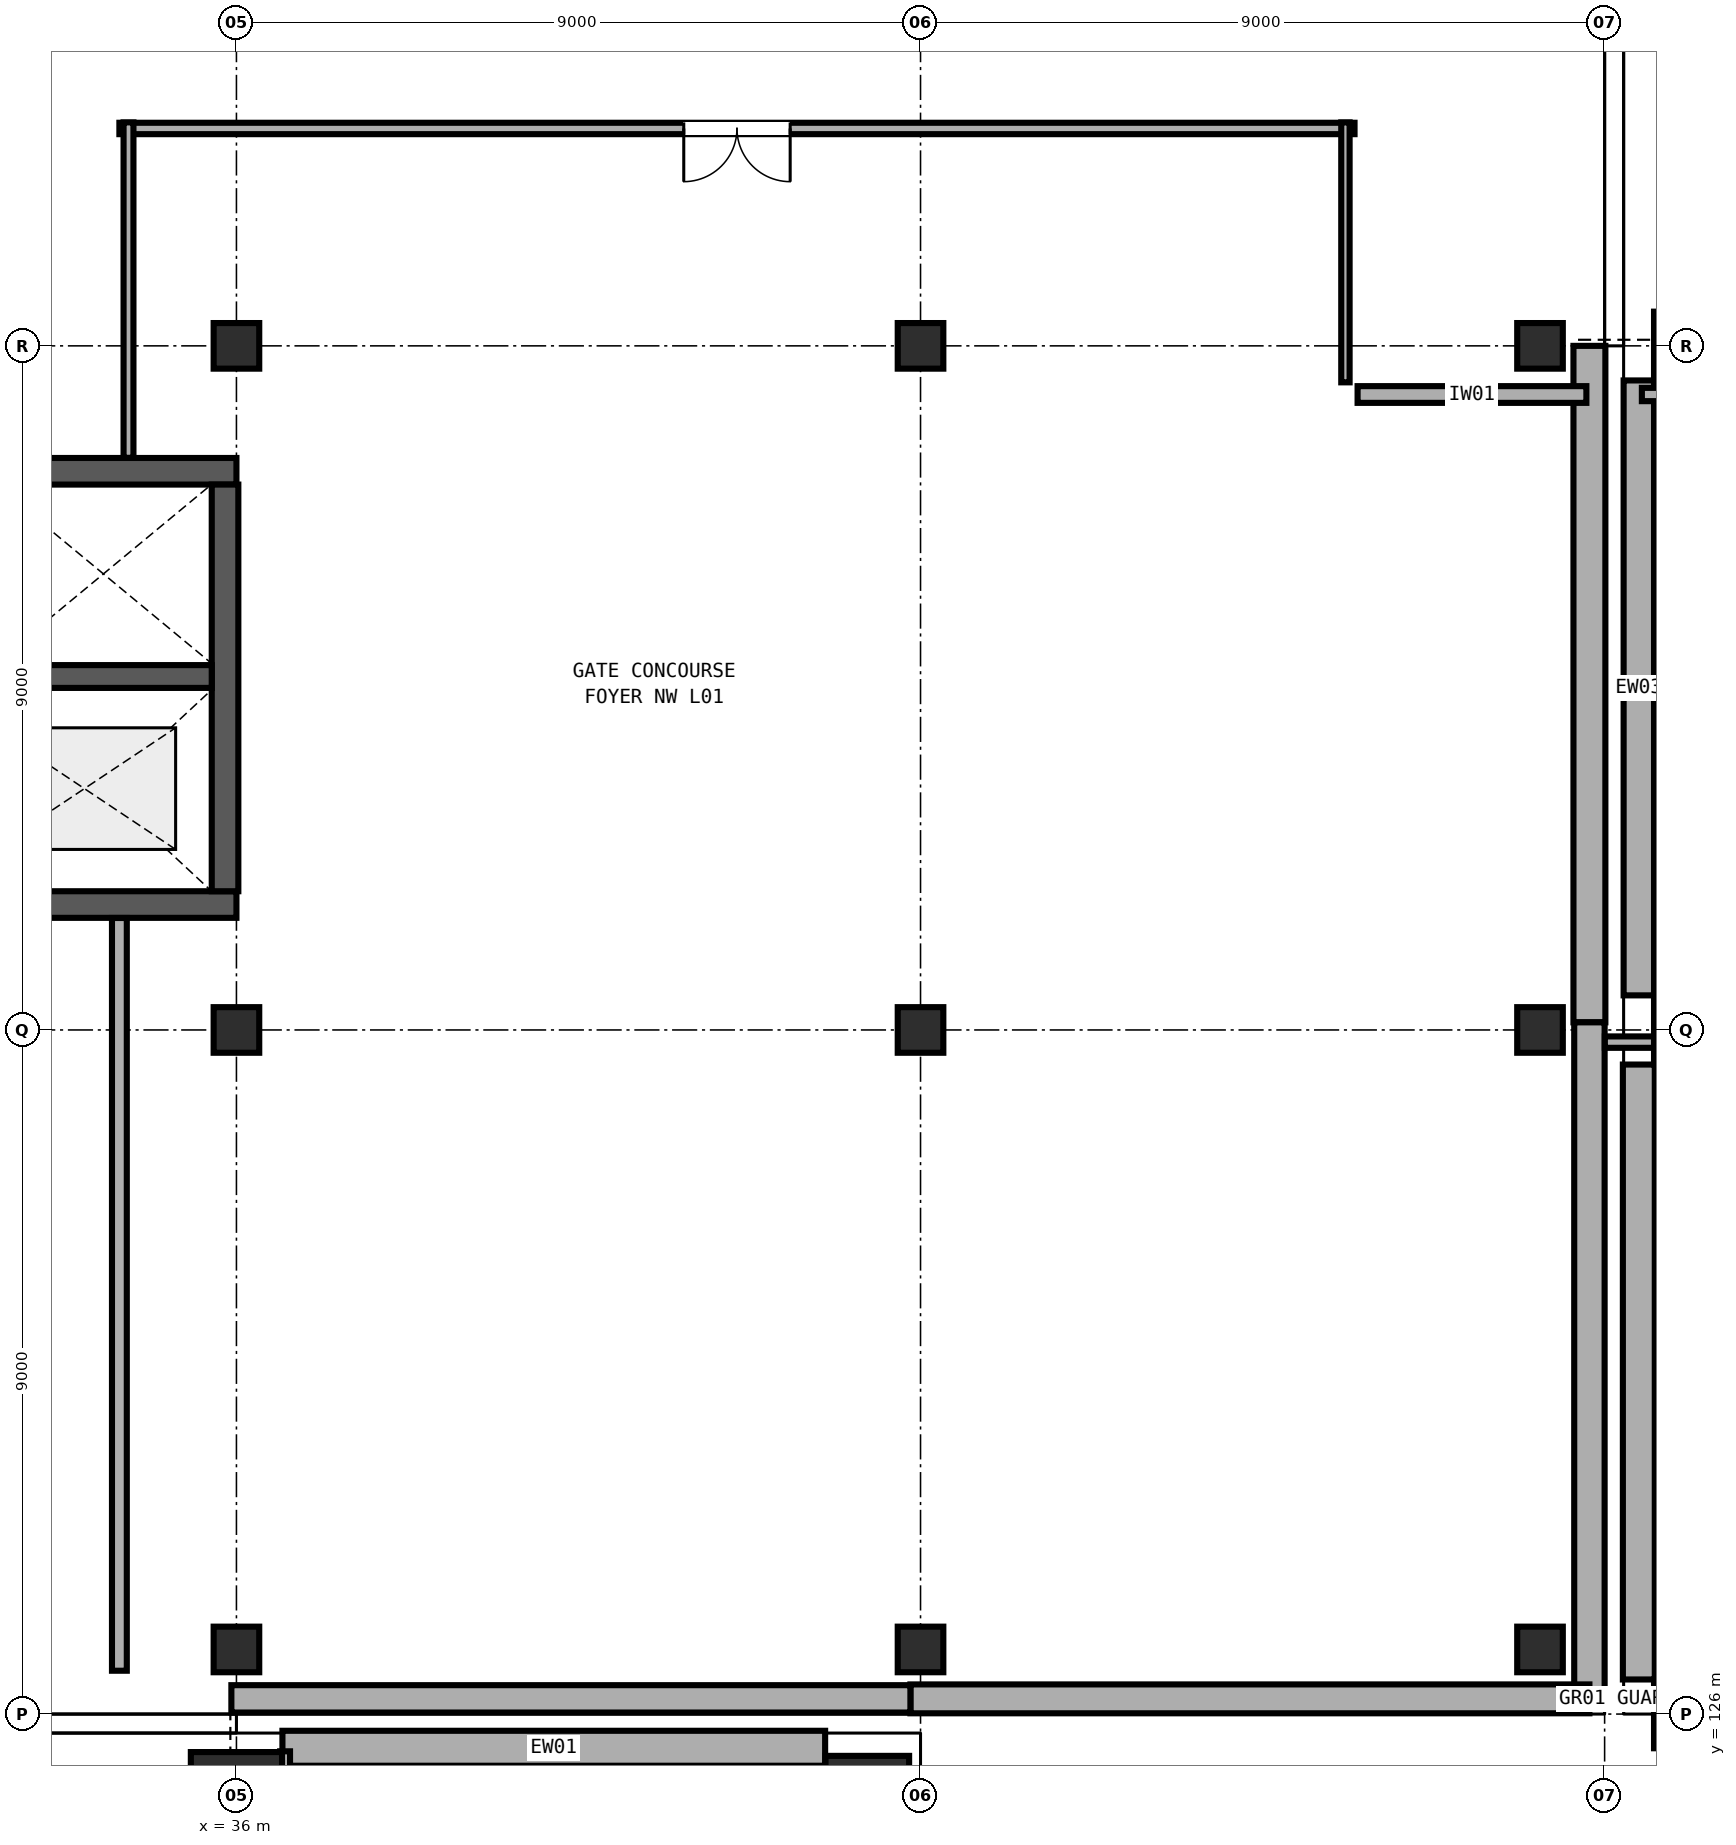
"""IFC4 building model, lengths in metres.
Left out: names, types, materials, properties, quantities, classifications, styles, units other than length and angle.
Written with IfcOpenShell. Run it as: python <this file> out.ifc"""

import sys

from ifc_helpers import new_model, si_unit, direction, frame, frame_2d, origin, origin_2d, place, context, subcontext, project, spatial, rectangle, extrude, element, fill, save


model = new_model("IFC4")
c1 = context("Model", 3, precision=1e-05, world=origin(), true_north=direction((0.0, 1.0)))
c2 = subcontext(c1, "Body", "Model", "MODEL_VIEW")
j1 = project(units=[si_unit("LENGTHUNIT", "METRE"), si_unit("PLANEANGLEUNIT", "RADIAN")], contexts=[c1])
p1 = place(None, origin())
s1 = spatial("IfcSite", under=j1, at=p1, CompositionType="ELEMENT")
p2 = place(p1, origin())
s2 = spatial("IfcBuilding", under=s1, at=p2, CompositionType="ELEMENT")
p3 = place(p2, frame((0.0, 0.0, 4.8)))
s3 = spatial("IfcBuildingStorey", under=s2, at=p3, CompositionType="ELEMENT", Elevation=4.8)
p4 = place(p3, frame((36.0, 124.9, 0.0), z_axis=(0.0, 0.0, 1.0), x_axis=(1.0, 0.0, 0.0)))
e1 = element("IfcColumn", 1, at=p4, inside=s3, PredefinedType="COLUMN", context=c2, shape_type="SweptSolid", body=[
    extrude(rectangle(XDim=1.2, YDim=1.2, at=origin_2d()), origin(), (0.0, 0.0, 1.0), 4.8),
])
p5 = place(p3, frame((44.3, 124.9, 0.0), z_axis=(0.0, 0.0, 1.0), x_axis=(1.0, 0.0, 0.0)))
e2 = element("IfcColumn", 2, at=p5, inside=s3, PredefinedType="COLUMN", context=c2, shape_type="SweptSolid", body=[
    extrude(rectangle(XDim=1.1, YDim=1.1, at=origin_2d()), origin(), (0.0, 0.0, 1.0), 4.8),
])
for number, where, z_axis, x_axis in (
    (3, (55.1, 126.0, 0.0), (0.0, 0.0, 1.0), (1.0, 0.0, 0.0)),
    (4, (55.1, 135.0, 0.0), (0.0, 0.0, 1.0), (1.0, 0.0, 0.0)),
    (5, (55.1, 144.0, 0.0), (0.0, 0.0, 1.0), (1.0, 0.0, 0.0)),
):
    element("IfcColumn", number, at=place(p3, frame(where, z_axis=z_axis, x_axis=x_axis)), inside=s3, PredefinedType="COLUMN", context=c2, shape_type="SweptSolid", body=[
        extrude(rectangle(XDim=0.9, YDim=0.9, at=origin_2d()), origin(), (0.0, 0.0, 1.0), 4.8),
    ])
for number, where, z_axis, x_axis in (
    (6, (36.0, 126.85, 0.0), (0.0, 0.0, 1.0), (1.0, 0.0, 0.0)),
    (7, (36.0, 135.0, 0.0), (0.0, 0.0, 1.0), (1.0, 0.0, 0.0)),
    (8, (36.0, 144.0, 0.0), (0.0, 0.0, 1.0), (1.0, 0.0, 0.0)),
    (9, (45.0, 126.85, 0.0), (0.0, 0.0, 1.0), (1.0, 0.0, 0.0)),
    (10, (45.0, 135.0, 0.0), (0.0, 0.0, 1.0), (1.0, 0.0, 0.0)),
    (11, (45.0, 144.0, 0.0), (0.0, 0.0, 1.0), (1.0, 0.0, 0.0)),
    (12, (53.15, 126.85, 0.0), (0.0, 0.0, 1.0), (1.0, 0.0, 0.0)),
    (13, (53.15, 135.0, 0.0), (0.0, 0.0, 1.0), (1.0, 0.0, 0.0)),
    (14, (53.15, 144.0, 0.0), (0.0, 0.0, 1.0), (1.0, 0.0, 0.0)),
):
    element("IfcColumn", number, at=place(p3, frame(where, z_axis=z_axis, x_axis=x_axis)), inside=s3, PredefinedType="COLUMN", context=c2, shape_type="SweptSolid", body=[
        extrude(rectangle(XDim=0.6, YDim=0.6, at=origin_2d()), origin(), (0.0, 0.0, 1.0), 4.8),
    ])
p6 = place(p3, frame((18.0, 136.65, 0.0), z_axis=(0.0, 0.0, 1.0), x_axis=(1.0, 0.0, 0.0)))
e15 = element("IfcWall", 15, at=p6, inside=s3, PredefinedType="SHEAR", context=c2, shape_type="SweptSolid", body=[
    extrude(rectangle(XDim=18.0, YDim=0.35, at=frame_2d((9.0, 0.0))), origin(), (0.0, 0.0, 1.0), 4.565),
])
p7 = place(p3, frame((36.0, 142.35, 0.0), z_axis=(0.0, 0.0, 1.0), x_axis=(-1.0, 0.0, 0.0)))
e16 = element("IfcWall", 16, at=p7, inside=s3, PredefinedType="SHEAR", context=c2, shape_type="SweptSolid", body=[
    extrude(rectangle(XDim=18.0, YDim=0.35, at=frame_2d((9.0, 0.0))), origin(), (0.0, 0.0, 1.0), 4.565),
])
p8 = place(p7, frame((4.7, 0.0, 0.0)))
e17 = element("IfcOpeningElement", 17, at=p8, cuts=e16, PredefinedType="OPENING", context=c2, shape_type="SweptSolid", body=[
    extrude(rectangle(XDim=1.9, YDim=2.25, at=frame_2d((0.95, 1.125))), frame((0.0, 0.185, 0.0), z_axis=(0.0, -1.0, 0.0), x_axis=(1.0, 0.0, 0.0)), (0.0, 0.0, 1.0), 0.37),
])
p9 = place(p3, frame((35.85, 136.825, 0.0), z_axis=(0.0, 0.0, 1.0), x_axis=(0.0, 1.0, 0.0)))
e18 = element("IfcWall", 18, at=p9, inside=s3, PredefinedType="SHEAR", context=c2, shape_type="SweptSolid", body=[
    extrude(rectangle(XDim=5.35, YDim=0.35, at=frame_2d((2.675, 0.0))), origin(), (0.0, 0.0, 1.0), 4.565),
])
p10 = place(p3, frame((32.8, 139.65, 0.0), z_axis=(0.0, 0.0, 1.0), x_axis=(1.0, 0.0, 0.0)))
e19 = element("IfcWall", 19, at=p10, inside=s3, PredefinedType="SHEAR", context=c2, shape_type="SweptSolid", body=[
    extrude(rectangle(XDim=2.875, YDim=0.3, at=frame_2d((1.438, 0.0))), origin(), (0.0, 0.0, 1.0), 4.565),
])
p11 = place(p3, frame((36.605, 125.55, 0.0), z_axis=(0.0, 0.0, 1.0), x_axis=(1.0, 0.0, 0.0)))
e20 = element("IfcWall", 20, at=p11, inside=s3, PredefinedType="SOLIDWALL", context=c2, shape_type="SweptSolid", body=[
    extrude(rectangle(XDim=7.14, YDim=0.46, at=frame_2d((3.57, 0.0))), origin(), (0.0, 0.0, 1.0), 3.28),
])
p12 = place(p3, frame((54.45, 126.455, 0.0), z_axis=(0.0, 0.0, 1.0), x_axis=(0.0, 1.0, 0.0)))
e21 = element("IfcWall", 21, at=p12, inside=s3, PredefinedType="SOLIDWALL", context=c2, shape_type="SweptSolid", body=[
    extrude(rectangle(XDim=8.09, YDim=0.42, at=frame_2d((4.045, 0.0))), origin(), (0.0, 0.0, 1.0), 3.28),
])
p13 = place(p3, frame((54.45, 135.455, 0.0), z_axis=(0.0, 0.0, 1.0), x_axis=(0.0, 1.0, 0.0)))
e22 = element("IfcWall", 22, at=p13, inside=s3, PredefinedType="SOLIDWALL", context=c2, shape_type="SweptSolid", body=[
    extrude(rectangle(XDim=8.09, YDim=0.4, at=frame_2d((4.045, 0.0))), origin(), (0.0, 0.0, 1.0), 3.28),
])
p14 = place(p3, frame((53.8, 144.0, 0.0), z_axis=(0.0, 0.0, 1.0), x_axis=(0.0, -1.0, 0.0)))
e23 = element("IfcWall", 23, at=p14, inside=s3, PredefinedType="SOLIDWALL", context=c2, shape_type="SweptSolid", body=[
    extrude(rectangle(XDim=8.9, YDim=0.42, at=frame_2d((4.45, 0.0))), origin(), (0.0, 0.0, 1.0), 3.28),
])
p15 = place(p3, frame((53.8, 135.1, 0.0), z_axis=(0.0, 0.0, 1.0), x_axis=(0.0, -1.0, 0.0)))
e24 = element("IfcWall", 24, at=p15, inside=s3, PredefinedType="SOLIDWALL", context=c2, shape_type="SweptSolid", body=[
    extrude(rectangle(XDim=8.9, YDim=0.4, at=frame_2d((4.45, 0.0))), origin(), (0.0, 0.0, 1.0), 3.28),
])
p16 = place(p3, frame((53.8, 126.2, 0.0), z_axis=(0.0, 0.0, 1.0), x_axis=(-1.0, 0.0, 0.0)))
e25 = element("IfcWall", 25, at=p16, inside=s3, PredefinedType="SOLIDWALL", context=c2, shape_type="SweptSolid", body=[
    extrude(rectangle(XDim=8.933, YDim=0.38, at=frame_2d((4.467, 0.0))), origin(), (0.0, 0.0, 1.0), 3.28),
])
p17 = place(p3, frame((44.867, 126.2, 0.0), z_axis=(0.0, 0.0, 1.0), x_axis=(-1.0, 0.0, 0.0)))
e26 = element("IfcWall", 26, at=p17, inside=s3, PredefinedType="SOLIDWALL", context=c2, shape_type="SweptSolid", body=[
    extrude(rectangle(XDim=8.933, YDim=0.36, at=frame_2d((4.467, 0.0))), origin(), (0.0, 0.0, 1.0), 3.28),
])
p18 = place(p3, frame((36.64, 122.5, 0.0), z_axis=(0.0, 0.0, 1.0), x_axis=(0.0, 1.0, 0.0)))
e27 = element("IfcWall", 27, at=p18, inside=s3, PredefinedType="PARTITIONING", context=c2, shape_type="SweptSolid", body=[
    extrude(rectangle(XDim=3.01, YDim=0.13, at=frame_2d((1.505, 0.0))), origin(), (0.0, 0.0, 1.0), 3.28),
])
p19 = place(p3, frame((54.49, 143.36, 0.0), z_axis=(0.0, 0.0, 1.0), x_axis=(1.0, 0.0, 0.0)))
e28 = element("IfcWall", 28, at=p19, inside=s3, PredefinedType="PARTITIONING", context=c2, shape_type="SweptSolid", body=[
    extrude(rectangle(XDim=2.75, YDim=0.175, at=frame_2d((1.375, 0.0))), origin(), (0.0, 0.0, 1.0), 3.28),
])
p20 = place(p3, frame((57.24, 134.84, 0.0), z_axis=(0.0, 0.0, 1.0), x_axis=(-1.0, 0.0, 0.0)))
e29 = element("IfcWall", 29, at=p20, inside=s3, PredefinedType="PARTITIONING", context=c2, shape_type="SweptSolid", body=[
    extrude(rectangle(XDim=3.237, YDim=0.15, at=frame_2d((1.619, 0.0))), origin(), (0.0, 0.0, 1.0), 3.28),
])
p21 = place(p3, frame((50.71, 146.86, 0.0), z_axis=(0.0, 0.0, 1.0), x_axis=(-1.0, 0.0, 0.0)))
e30 = element("IfcWall", 30, at=p21, inside=s3, PredefinedType="PARTITIONING", context=c2, shape_type="SweptSolid", body=[
    extrude(rectangle(XDim=16.25, YDim=0.15, at=frame_2d((8.125, 0.0))), origin(), (0.0, 0.0, 1.0), 3.28),
])
p22 = place(p21, frame((7.425, 0.0, 0.0)))
e31 = element("IfcOpeningElement", 31, at=p22, cuts=e30, PredefinedType="OPENING", context=c2, shape_type="SweptSolid", body=[
    extrude(rectangle(XDim=1.4, YDim=2.15, at=frame_2d((0.7, 1.075))), frame((0.0, 0.085, 0.0), z_axis=(0.0, -1.0, 0.0), x_axis=(1.0, 0.0, 0.0)), (0.0, 0.0, 1.0), 0.17),
])
p23 = place(p3, frame((34.58, 142.527, 0.0), z_axis=(0.0, 0.0, 1.0), x_axis=(0.0, 1.0, 0.0)))
e32 = element("IfcWall", 32, at=p23, inside=s3, PredefinedType="PARTITIONING", context=c2, shape_type="SweptSolid", body=[
    extrude(rectangle(XDim=4.413, YDim=0.13, at=frame_2d((2.207, 0.0))), origin(), (0.0, 0.0, 1.0), 3.28),
])
p24 = place(p3, frame((50.59, 146.94, 0.0), z_axis=(0.0, 0.0, 1.0), x_axis=(0.0, -1.0, 0.0)))
e33 = element("IfcWall", 33, at=p24, inside=s3, PredefinedType="PARTITIONING", context=c2, shape_type="SweptSolid", body=[
    extrude(rectangle(XDim=3.42, YDim=0.11, at=frame_2d((1.71, 0.0))), origin(), (0.0, 0.0, 1.0), 3.28),
])
p25 = place(p3, frame((50.75, 143.36, 0.0), z_axis=(0.0, 0.0, 1.0), x_axis=(1.0, 0.0, 0.0)))
e34 = element("IfcWall", 34, at=p25, inside=s3, PredefinedType="PARTITIONING", context=c2, shape_type="SweptSolid", body=[
    extrude(rectangle(XDim=3.01, YDim=0.22, at=frame_2d((1.505, 0.0))), origin(), (0.0, 0.0, 1.0), 3.28),
])
p26 = place(p3, frame((34.46, 126.57, 0.0), z_axis=(0.0, 0.0, 1.0), x_axis=(0.0, 1.0, 0.0)))
e35 = element("IfcWall", 35, at=p26, inside=s3, PredefinedType="PARTITIONING", context=c2, shape_type="SweptSolid", body=[
    extrude(rectangle(XDim=9.903, YDim=0.195, at=frame_2d((4.951, 0.0))), origin(), (0.0, 0.0, 1.0), 3.28),
])
p27 = place(p22, origin())
e36 = element("IfcDoor", 36, at=p27, inside=s3, OperationType="DOUBLE_DOOR_SINGLE_SWING", PredefinedType="DOOR", context=c2, shape_type="SweptSolid", body=[
    extrude(rectangle(XDim=1.4, YDim=2.15, at=frame_2d((0.7, 1.075))), frame((0.0, 0.025, 0.0), z_axis=(0.0, -1.0, 0.0), x_axis=(1.0, 0.0, 0.0)), (0.0, 0.0, 1.0), 0.05),
])
fill(e31, e36)
save(model, sys.argv[1])
